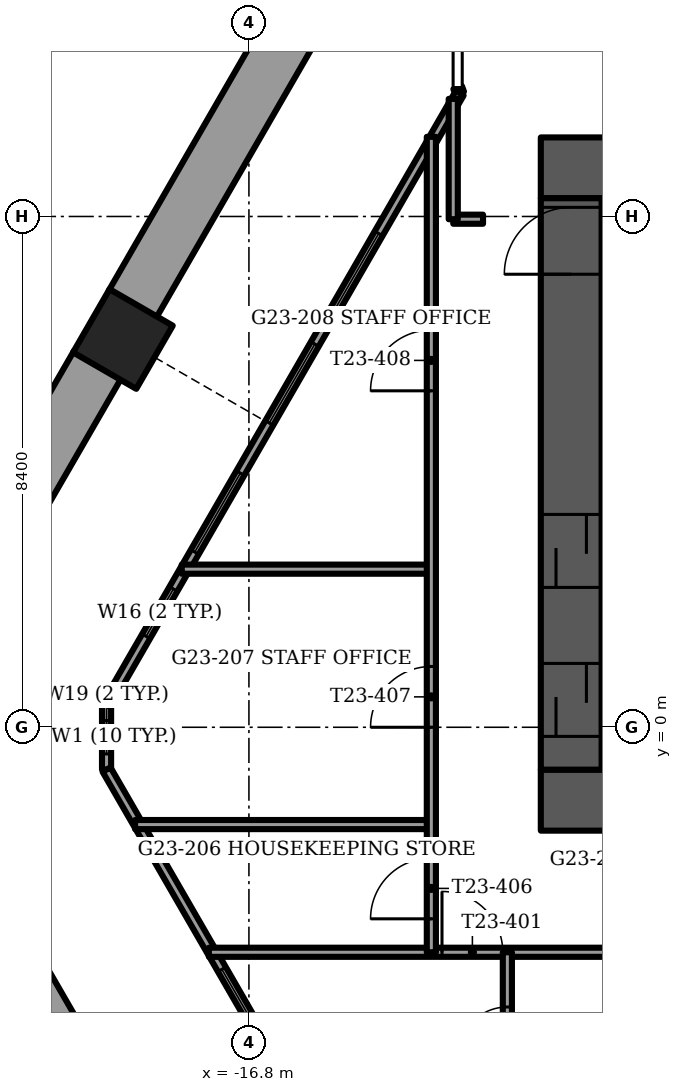
"""IFC4 building model, lengths in metres.
Left out: names, types, materials, properties, quantities, classifications, styles, units other than length and angle.
Written with IfcOpenShell. Run it as: python <this file> out.ifc"""

import sys

from ifc_helpers import new_model, si_unit, direction, frame, frame_2d, origin, origin_2d, place, context, subcontext, project, spatial, rectangle, extrude, element, fill, save


model = new_model("IFC4")
c1 = context("Model", 3, precision=1e-05, world=origin(), true_north=direction((0.0, 1.0)))
c2 = subcontext(c1, "Body", "Model", "MODEL_VIEW")
j1 = project(units=[si_unit("LENGTHUNIT", "METRE"), si_unit("PLANEANGLEUNIT", "RADIAN")], contexts=[c1])
p1 = place(None, origin())
s1 = spatial("IfcSite", under=j1, at=p1, CompositionType="ELEMENT")
p2 = place(p1, origin())
s2 = spatial("IfcBuilding", under=s1, at=p2, CompositionType="ELEMENT")
p3 = place(p2, frame((0.0, 0.0, 93.0)))
s3 = spatial("IfcBuildingStorey", under=s2, at=p3, CompositionType="ELEMENT", Elevation=93.0)
p4 = place(p3, frame((-18.872, 6.385, -1.2), z_axis=(0.0, 0.0, 1.0), x_axis=(0.5, 0.866025403784, 0.0)))
e1 = element("IfcColumn", 1, at=p4, inside=s3, PredefinedType="COLUMN", context=c2, shape_type="SweptSolid", body=[
    extrude(rectangle(XDim=1.2, YDim=1.2, at=origin_2d()), origin(), (0.0, 0.0, 1.0), 3.75),
])
p5 = place(p3, frame((-12.0, -1.2, -0.3), z_axis=(0.0, 0.0, 1.0), x_axis=(1.0, 0.0, 0.0)))
e2 = element("IfcWall", 2, at=p5, inside=s3, PredefinedType="SHEAR", context=c2, shape_type="SweptSolid", body=[
    extrude(rectangle(XDim=24.0, YDim=1.0, at=frame_2d((12.0, 0.0))), origin(), (0.0, 0.0, 1.0), 3.75),
])
p6 = place(p5, frame((11.2, 0.0, 0.0)))
e3 = element("IfcOpeningElement", 3, at=p6, cuts=e2, PredefinedType="OPENING", context=c2, shape_type="SweptSolid", body=[
    extrude(rectangle(XDim=1.6, YDim=2.1, at=frame_2d((0.8, 1.05))), frame((0.0, 0.5, 0.0), z_axis=(0.0, -1.0, 0.0), x_axis=(1.0, 0.0, 0.0)), (0.0, 0.0, 1.0), 1.0),
])
p7 = place(p3, frame((-12.0, 9.2, -0.3), z_axis=(0.0, 0.0, 1.0), x_axis=(1.0, 0.0, 0.0)))
e4 = element("IfcWall", 4, at=p7, inside=s3, PredefinedType="SHEAR", context=c2, shape_type="SweptSolid", body=[
    extrude(rectangle(XDim=24.0, YDim=1.0, at=frame_2d((12.0, 0.0))), origin(), (0.0, 0.0, 1.0), 3.75),
])
p8 = place(p7, frame((11.2, 0.0, 0.0)))
e5 = element("IfcOpeningElement", 5, at=p8, cuts=e4, PredefinedType="OPENING", context=c2, shape_type="SweptSolid", body=[
    extrude(rectangle(XDim=1.6, YDim=2.1, at=frame_2d((0.8, 1.05))), frame((0.0, 0.5, 0.0), z_axis=(0.0, -1.0, 0.0), x_axis=(1.0, 0.0, 0.0)), (0.0, 0.0, 1.0), 1.0),
])
p9 = place(p7, frame((5.25, 0.0, 0.0)))
e6 = element("IfcOpeningElement", 6, at=p9, cuts=e4, PredefinedType="OPENING", context=c2, shape_type="SweptSolid", body=[
    extrude(rectangle(XDim=1.1, YDim=2.1, at=frame_2d((0.55, 1.05))), frame((0.0, 0.5, 0.0), z_axis=(0.0, -1.0, 0.0), x_axis=(1.0, 0.0, 0.0)), (0.0, 0.0, 1.0), 1.0),
])
p10 = place(p7, frame((17.65, 0.0, 0.0)))
e7 = element("IfcOpeningElement", 7, at=p10, cuts=e4, PredefinedType="OPENING", context=c2, shape_type="SweptSolid", body=[
    extrude(rectangle(XDim=1.1, YDim=2.1, at=frame_2d((0.55, 1.05))), frame((0.0, 0.5, 0.0), z_axis=(0.0, -1.0, 0.0), x_axis=(1.0, 0.0, 0.0)), (0.0, 0.0, 1.0), 1.0),
])
p11 = place(p3, frame((-11.5, -0.7, -0.3), z_axis=(0.0, 0.0, 1.0), x_axis=(0.0, 1.0, 0.0)))
e8 = element("IfcWall", 8, at=p11, inside=s3, PredefinedType="SHEAR", context=c2, shape_type="SweptSolid", body=[
    extrude(rectangle(XDim=9.4, YDim=1.0, at=frame_2d((4.7, 0.0))), origin(), (0.0, 0.0, 1.0), 3.75),
])
p12 = place(p11, frame((8.15, 0.0, 0.0)))
e9 = element("IfcOpeningElement", 9, at=p12, cuts=e8, PredefinedType="OPENING", context=c2, shape_type="SweptSolid", body=[
    extrude(rectangle(XDim=1.1, YDim=2.1, at=frame_2d((0.55, 1.05))), frame((0.0, 0.5, 0.0), z_axis=(0.0, -1.0, 0.0), x_axis=(1.0, 0.0, 0.0)), (0.0, 0.0, 1.0), 1.0),
])
p13 = place(p11, frame((0.55, 0.0, 0.0)))
e10 = element("IfcOpeningElement", 10, at=p13, cuts=e8, PredefinedType="OPENING", context=c2, shape_type="SweptSolid", body=[
    extrude(rectangle(XDim=1.2, YDim=2.1, at=frame_2d((0.6, 1.05))), frame((0.0, 0.5, 0.0), z_axis=(0.0, -1.0, 0.0), x_axis=(1.0, 0.0, 0.0)), (0.0, 0.0, 1.0), 1.0),
])
p14 = place(p11, frame((3.0, 0.0, 0.0)))
e11 = element("IfcOpeningElement", 11, at=p14, cuts=e8, PredefinedType="OPENING", context=c2, shape_type="SweptSolid", body=[
    extrude(rectangle(XDim=1.2, YDim=2.1, at=frame_2d((0.6, 1.05))), frame((0.0, 0.5, 0.0), z_axis=(0.0, -1.0, 0.0), x_axis=(1.0, 0.0, 0.0)), (0.0, 0.0, 1.0), 1.0),
])
p15 = place(p3, frame((-15.381, 12.733, 0.0), z_axis=(0.0, 0.0, 1.0), x_axis=(-0.499999023957, -0.866025967302, 0.0)))
e12 = element("IfcWall", 12, at=p15, inside=s3, PredefinedType="PARAPET", context=c2, shape_type="SweptSolid", body=[
    extrude(rectangle(XDim=6.673, YDim=0.9, at=frame_2d((3.337, 0.0))), origin(), (0.0, 0.0, 1.0), 1.1),
])
p16 = place(p3, frame((-19.287, 5.966, 0.0), z_axis=(0.0, 0.0, 1.0), x_axis=(-0.500011789842, -0.866018596809, 0.0)))
e13 = element("IfcWall", 13, at=p16, inside=s3, PredefinedType="PARAPET", context=c2, shape_type="SweptSolid", body=[
    extrude(rectangle(XDim=6.427, YDim=0.9, at=frame_2d((3.214, 0.0))), origin(), (0.0, 0.0, 1.0), 1.1),
])
p17 = place(p3, frame((-22.501, -0.727, 0.0), z_axis=(0.0, 0.0, 1.0), x_axis=(0.500006801911, -0.866021476663, 0.0)))
e14 = element("IfcWall", 14, at=p17, inside=s3, PredefinedType="PARAPET", context=c2, shape_type="SweptSolid", body=[
    extrude(rectangle(XDim=6.144, YDim=0.9, at=frame_2d((3.072, 0.0))), origin(), (0.0, 0.0, 1.0), 1.1),
])
p18 = place(p3, frame((-13.334, 10.427, 0.0), z_axis=(0.0, 0.0, 1.0), x_axis=(-0.500002662854, -0.86602386638, 0.0)))
e15 = element("IfcWall", 15, at=p18, inside=s3, PredefinedType="SOLIDWALL", context=c2, shape_type="SweptSolid", body=[
    extrude(rectangle(XDim=11.615, YDim=0.15, at=frame_2d((5.807, 0.0))), origin(), (0.0, 0.0, 1.0), 3.45),
])
p19 = place(p18, frame((2.664, 0.0, 0.15)))
e16 = element("IfcOpeningElement", 16, at=p19, cuts=e15, PredefinedType="OPENING", context=c2, shape_type="SweptSolid", body=[
    extrude(rectangle(XDim=1.7, YDim=2.2, at=frame_2d((0.85, 1.1))), frame((0.0, 0.075, 0.0), z_axis=(0.0, -1.0, 0.0), x_axis=(1.0, 0.0, 0.0)), (0.0, 0.0, 1.0), 0.15),
])
p20 = place(p18, frame((4.764, 0.0, 0.15)))
e17 = element("IfcOpeningElement", 17, at=p20, cuts=e15, PredefinedType="OPENING", context=c2, shape_type="SweptSolid", body=[
    extrude(rectangle(XDim=1.5, YDim=2.2, at=frame_2d((0.75, 1.1))), frame((0.0, 0.075, 0.0), z_axis=(0.0, -1.0, 0.0), x_axis=(1.0, 0.0, 0.0)), (0.0, 0.0, 1.0), 0.15),
])
p21 = place(p18, frame((9.414, 0.0, 0.15)))
e18 = element("IfcOpeningElement", 18, at=p21, cuts=e15, PredefinedType="OPENING", context=c2, shape_type="SweptSolid", body=[
    extrude(rectangle(XDim=0.9, YDim=2.2, at=frame_2d((0.45, 1.1))), frame((0.0, 0.075, 0.0), z_axis=(0.0, -1.0, 0.0), x_axis=(1.0, 0.0, 0.0)), (0.0, 0.0, 1.0), 0.15),
])
p22 = place(p18, frame((7.214, 0.0, 0.15)))
e19 = element("IfcOpeningElement", 19, at=p22, cuts=e15, PredefinedType="OPENING", context=c2, shape_type="SweptSolid", body=[
    extrude(rectangle(XDim=1.5, YDim=2.2, at=frame_2d((0.75, 1.1))), frame((0.0, 0.075, 0.0), z_axis=(0.0, -1.0, 0.0), x_axis=(1.0, 0.0, 0.0)), (0.0, 0.0, 1.0), 0.15),
])
p23 = place(p3, frame((-19.141, -0.696, 0.0), z_axis=(0.0, 0.0, 1.0), x_axis=(0.500002662854, -0.86602386638, 0.0)))
e20 = element("IfcWall", 20, at=p23, inside=s3, PredefinedType="SOLIDWALL", context=c2, shape_type="SweptSolid", body=[
    extrude(rectangle(XDim=11.615, YDim=0.15, at=frame_2d((5.807, 0.0))), origin(), (0.0, 0.0, 1.0), 3.45),
])
p24 = place(p23, frame((3.792, 0.0, 0.15)))
e21 = element("IfcOpeningElement", 21, at=p24, cuts=e20, PredefinedType="OPENING", context=c2, shape_type="SweptSolid", body=[
    extrude(rectangle(XDim=1.7, YDim=2.2, at=frame_2d((0.85, 1.1))), frame((0.0, 0.075, 0.0), z_axis=(0.0, -1.0, 0.0), x_axis=(1.0, 0.0, 0.0)), (0.0, 0.0, 1.0), 0.15),
])
p25 = place(p23, frame((9.531, 0.0, 0.15)))
e22 = element("IfcOpeningElement", 22, at=p25, cuts=e20, PredefinedType="OPENING", context=c2, shape_type="SweptSolid", body=[
    extrude(rectangle(XDim=0.9, YDim=2.2, at=frame_2d((0.45, 1.1))), frame((0.0, 0.075, 0.0), z_axis=(0.0, -1.0, 0.0), x_axis=(1.0, 0.0, 0.0)), (0.0, 0.0, 1.0), 0.15),
])
p26 = place(p23, frame((7.98, 0.0, 0.0)))
e23 = element("IfcOpeningElement", 23, at=p26, cuts=e20, PredefinedType="OPENING", context=c2, shape_type="SweptSolid", body=[
    extrude(rectangle(XDim=1.5, YDim=2.4, at=frame_2d((0.75, 1.2))), frame((0.0, 0.075, 0.0), z_axis=(0.0, -1.0, 0.0), x_axis=(1.0, 0.0, 0.0)), (0.0, 0.0, 1.0), 0.15),
])
p27 = place(p3, frame((-19.141, 0.369, 0.0), z_axis=(0.0, 0.0, 1.0), x_axis=(0.0, -1.0, 0.0)))
e24 = element("IfcWall", 24, at=p27, inside=s3, PredefinedType="SOLIDWALL", context=c2, shape_type="SweptSolid", body=[
    extrude(rectangle(XDim=1.065, YDim=0.15, at=frame_2d((0.533, 0.0))), origin(), (0.0, 0.0, 1.0), 3.45),
])
p28 = place(p27, frame((0.258, 0.0, 0.15)))
e25 = element("IfcOpeningElement", 25, at=p28, cuts=e24, PredefinedType="OPENING", context=c2, shape_type="SweptSolid", body=[
    extrude(rectangle(XDim=0.55, YDim=2.2, at=frame_2d((0.275, 1.1))), frame((0.0, 0.075, 0.0), z_axis=(0.0, -1.0, 0.0), x_axis=(1.0, 0.0, 0.0)), (0.0, 0.0, 1.0), 0.15),
])
p29 = place(p3, frame((-13.334, 10.427, 0.0), z_axis=(0.0, 0.0, 1.0), x_axis=(-0.337751931921, 0.941235163221, 0.0)))
e26 = element("IfcWall", 26, at=p29, inside=s3, PredefinedType="SOLIDWALL", context=c2, shape_type="SweptSolid", body=[
    extrude(rectangle(XDim=0.098, YDim=0.15, at=frame_2d((0.049, 0.0))), origin(), (0.0, 0.0, 1.0), 3.45),
])
p30 = place(p3, frame((-17.459, -3.7, 0.0), z_axis=(0.0, 0.0, 1.0), x_axis=(1.0, 0.0, 0.0)))
e27 = element("IfcWall", 27, at=p30, inside=s3, PredefinedType="PARTITIONING", context=c2, shape_type="SweptSolid", body=[
    extrude(rectangle(XDim=8.299, YDim=0.15, at=frame_2d((4.149, 0.0))), origin(), (0.0, 0.0, 1.0), 3.45),
])
p31 = place(p30, frame((3.834, 0.0, 0.0)))
e28 = element("IfcOpeningElement", 28, at=p31, cuts=e27, PredefinedType="OPENING", context=c2, shape_type="SweptSolid", body=[
    extrude(rectangle(XDim=1.0, YDim=2.1, at=frame_2d((0.5, 1.05))), frame((0.0, 0.075, 0.0), z_axis=(0.0, -1.0, 0.0), x_axis=(1.0, 0.0, 0.0)), (0.0, 0.0, 1.0), 0.15),
])
p32 = place(p3, frame((-18.672, -1.6, 0.0), z_axis=(0.0, 0.0, 1.0), x_axis=(1.0, 0.0, 0.0)))
e29 = element("IfcWall", 29, at=p32, inside=s3, PredefinedType="PARTITIONING", context=c2, shape_type="SweptSolid", body=[
    extrude(rectangle(XDim=4.872, YDim=0.15, at=frame_2d((2.436, 0.0))), origin(), (0.0, 0.0, 1.0), 3.45),
])
p33 = place(p3, frame((-17.905, 2.6, 0.0), z_axis=(0.0, 0.0, 1.0), x_axis=(1.0, 0.0, 0.0)))
e30 = element("IfcWall", 30, at=p33, inside=s3, PredefinedType="PARTITIONING", context=c2, shape_type="SweptSolid", body=[
    extrude(rectangle(XDim=4.105, YDim=0.15, at=frame_2d((2.052, 0.0))), origin(), (0.0, 0.0, 1.0), 3.45),
])
p34 = place(p3, frame((-13.44, 8.355, 0.0), z_axis=(0.0, 0.0, 1.0), x_axis=(1.0, 0.0, 0.0)))
e31 = element("IfcWall", 31, at=p34, inside=s3, PredefinedType="PARTITIONING", context=c2, shape_type="SweptSolid", body=[
    extrude(rectangle(XDim=0.49, YDim=0.15, at=frame_2d((0.245, 0.0))), origin(), (0.0, 0.0, 1.0), 3.45),
])
p35 = place(p3, frame((-12.55, -6.3, 0.0), z_axis=(0.0, 0.0, 1.0), x_axis=(0.0, 1.0, 0.0)))
e32 = element("IfcWall", 32, at=p35, inside=s3, PredefinedType="PARTITIONING", context=c2, shape_type="SweptSolid", body=[
    extrude(rectangle(XDim=2.6, YDim=0.15, at=frame_2d((1.3, 0.0))), origin(), (0.0, 0.0, 1.0), 3.45),
])
p36 = place(p35, frame((0.9, 0.0, 0.0)))
e33 = element("IfcOpeningElement", 33, at=p36, cuts=e32, PredefinedType="OPENING", context=c2, shape_type="SweptSolid", body=[
    extrude(rectangle(XDim=0.8, YDim=2.1, at=frame_2d((0.4, 1.05))), frame((0.0, 0.075, 0.0), z_axis=(0.0, -1.0, 0.0), x_axis=(1.0, 0.0, 0.0)), (0.0, 0.0, 1.0), 0.15),
])
p37 = place(p3, frame((-13.44, 8.355, 0.0), z_axis=(0.0, 0.0, 1.0), x_axis=(0.0, 1.0, 0.0)))
e34 = element("IfcWall", 34, at=p37, inside=s3, PredefinedType="PARTITIONING", context=c2, shape_type="SweptSolid", body=[
    extrude(rectangle(XDim=1.979, YDim=0.15, at=frame_2d((0.99, 0.0))), origin(), (0.0, 0.0, 1.0), 3.45),
])
p38 = place(p3, frame((-13.8, -3.7, 0.0), z_axis=(0.0, 0.0, 1.0), x_axis=(0.0, 1.0, 0.0)))
e35 = element("IfcWall", 35, at=p38, inside=s3, PredefinedType="PARTITIONING", context=c2, shape_type="SweptSolid", body=[
    extrude(rectangle(XDim=13.41, YDim=0.15, at=frame_2d((6.705, 0.0))), origin(), (0.0, 0.0, 1.0), 3.45),
])
p39 = place(p38, frame((0.55, 0.0, 0.0)))
e36 = element("IfcOpeningElement", 36, at=p39, cuts=e35, PredefinedType="OPENING", context=c2, shape_type="SweptSolid", body=[
    extrude(rectangle(XDim=1.0, YDim=2.1, at=frame_2d((0.5, 1.05))), frame((0.0, 0.075, 0.0), z_axis=(0.0, -1.0, 0.0), x_axis=(1.0, 0.0, 0.0)), (0.0, 0.0, 1.0), 0.15),
])
p40 = place(p38, frame((3.7, 0.0, 0.0)))
e37 = element("IfcOpeningElement", 37, at=p40, cuts=e35, PredefinedType="OPENING", context=c2, shape_type="SweptSolid", body=[
    extrude(rectangle(XDim=1.0, YDim=2.1, at=frame_2d((0.5, 1.05))), frame((0.0, 0.075, 0.0), z_axis=(0.0, -1.0, 0.0), x_axis=(1.0, 0.0, 0.0)), (0.0, 0.0, 1.0), 0.15),
])
p41 = place(p38, frame((9.233, 0.0, 0.0)))
e38 = element("IfcOpeningElement", 38, at=p41, cuts=e35, PredefinedType="OPENING", context=c2, shape_type="SweptSolid", body=[
    extrude(rectangle(XDim=1.0, YDim=2.1, at=frame_2d((0.5, 1.05))), frame((0.0, 0.075, 0.0), z_axis=(0.0, -1.0, 0.0), x_axis=(1.0, 0.0, 0.0)), (0.0, 0.0, 1.0), 0.15),
])
p42 = place(p19, origin())
e39 = element("IfcWindow", 39, at=p42, inside=s3, PartitioningType="SINGLE_PANEL", PredefinedType="WINDOW", context=c2, shape_type="SweptSolid", body=[
    extrude(rectangle(XDim=1.7, YDim=2.2, at=frame_2d((0.85, 1.1))), frame((0.0, 0.03, 0.0), z_axis=(0.0, -1.0, 0.0), x_axis=(1.0, 0.0, 0.0)), (0.0, 0.0, 1.0), 0.06),
])
fill(e16, e39)
p43 = place(p20, origin())
e40 = element("IfcWindow", 40, at=p43, inside=s3, PartitioningType="SINGLE_PANEL", PredefinedType="WINDOW", context=c2, shape_type="SweptSolid", body=[
    extrude(rectangle(XDim=1.5, YDim=2.2, at=frame_2d((0.75, 1.1))), frame((0.0, 0.03, 0.0), z_axis=(0.0, -1.0, 0.0), x_axis=(1.0, 0.0, 0.0)), (0.0, 0.0, 1.0), 0.06),
])
fill(e17, e40)
p44 = place(p21, origin())
e41 = element("IfcWindow", 41, at=p44, inside=s3, PartitioningType="SINGLE_PANEL", PredefinedType="WINDOW", context=c2, shape_type="SweptSolid", body=[
    extrude(rectangle(XDim=0.9, YDim=2.2, at=frame_2d((0.45, 1.1))), frame((0.0, 0.03, 0.0), z_axis=(0.0, -1.0, 0.0), x_axis=(1.0, 0.0, 0.0)), (0.0, 0.0, 1.0), 0.06),
])
fill(e18, e41)
p45 = place(p22, origin())
e42 = element("IfcWindow", 42, at=p45, inside=s3, PartitioningType="SINGLE_PANEL", PredefinedType="WINDOW", context=c2, shape_type="SweptSolid", body=[
    extrude(rectangle(XDim=1.5, YDim=2.2, at=frame_2d((0.75, 1.1))), frame((0.0, 0.03, 0.0), z_axis=(0.0, -1.0, 0.0), x_axis=(1.0, 0.0, 0.0)), (0.0, 0.0, 1.0), 0.06),
])
fill(e19, e42)
p46 = place(p24, origin())
e43 = element("IfcWindow", 43, at=p46, inside=s3, PartitioningType="SINGLE_PANEL", PredefinedType="WINDOW", context=c2, shape_type="SweptSolid", body=[
    extrude(rectangle(XDim=1.7, YDim=2.2, at=frame_2d((0.85, 1.1))), frame((0.0, 0.03, 0.0), z_axis=(0.0, -1.0, 0.0), x_axis=(1.0, 0.0, 0.0)), (0.0, 0.0, 1.0), 0.06),
])
fill(e21, e43)
p47 = place(p28, origin())
e44 = element("IfcWindow", 44, at=p47, inside=s3, PartitioningType="SINGLE_PANEL", PredefinedType="WINDOW", context=c2, shape_type="SweptSolid", body=[
    extrude(rectangle(XDim=0.55, YDim=2.2, at=frame_2d((0.275, 1.1))), frame((0.0, 0.03, 0.0), z_axis=(0.0, -1.0, 0.0), x_axis=(1.0, 0.0, 0.0)), (0.0, 0.0, 1.0), 0.06),
])
fill(e25, e44)
p48 = place(p12, origin())
e45 = element("IfcDoor", 45, at=p48, inside=s3, OperationType="SINGLE_SWING_LEFT", PredefinedType="DOOR", context=c2, shape_type="SweptSolid", body=[
    extrude(rectangle(XDim=1.1, YDim=2.1, at=frame_2d((0.55, 1.05))), frame((0.0, 0.025, 0.0), z_axis=(0.0, -1.0, 0.0), x_axis=(1.0, 0.0, 0.0)), (0.0, 0.0, 1.0), 0.05),
])
fill(e9, e45)
p49 = place(p13, origin())
e46 = element("IfcDoor", 46, at=p49, inside=s3, OperationType="SLIDING_TO_LEFT", PredefinedType="DOOR", context=c2, shape_type="SweptSolid", body=[
    extrude(rectangle(XDim=1.2, YDim=2.1, at=frame_2d((0.6, 1.05))), frame((0.0, 0.025, 0.0), z_axis=(0.0, -1.0, 0.0), x_axis=(1.0, 0.0, 0.0)), (0.0, 0.0, 1.0), 0.05),
])
fill(e10, e46)
p50 = place(p14, origin())
e47 = element("IfcDoor", 47, at=p50, inside=s3, OperationType="SLIDING_TO_LEFT", PredefinedType="DOOR", context=c2, shape_type="SweptSolid", body=[
    extrude(rectangle(XDim=1.2, YDim=2.1, at=frame_2d((0.6, 1.05))), frame((0.0, 0.025, 0.0), z_axis=(0.0, -1.0, 0.0), x_axis=(1.0, 0.0, 0.0)), (0.0, 0.0, 1.0), 0.05),
])
fill(e11, e47)
p51 = place(p31, origin())
e48 = element("IfcDoor", 48, at=p51, inside=s3, OperationType="SINGLE_SWING_LEFT", PredefinedType="DOOR", context=c2, shape_type="SweptSolid", body=[
    extrude(rectangle(XDim=1.0, YDim=2.1, at=frame_2d((0.5, 1.05))), frame((0.0, 0.025, 0.0), z_axis=(0.0, -1.0, 0.0), x_axis=(1.0, 0.0, 0.0)), (0.0, 0.0, 1.0), 0.05),
])
fill(e28, e48)
p52 = place(p36, origin())
e49 = element("IfcDoor", 49, at=p52, inside=s3, OperationType="SINGLE_SWING_RIGHT", PredefinedType="DOOR", context=c2, shape_type="SweptSolid", body=[
    extrude(rectangle(XDim=0.8, YDim=2.1, at=frame_2d((0.4, 1.05))), frame((0.0, 0.025, 0.0), z_axis=(0.0, -1.0, 0.0), x_axis=(1.0, 0.0, 0.0)), (0.0, 0.0, 1.0), 0.05),
])
fill(e33, e49)
p53 = place(p39, origin())
e50 = element("IfcDoor", 50, at=p53, inside=s3, OperationType="SINGLE_SWING_LEFT", PredefinedType="DOOR", context=c2, shape_type="SweptSolid", body=[
    extrude(rectangle(XDim=1.0, YDim=2.1, at=frame_2d((0.5, 1.05))), frame((0.0, 0.025, 0.0), z_axis=(0.0, -1.0, 0.0), x_axis=(1.0, 0.0, 0.0)), (0.0, 0.0, 1.0), 0.05),
])
fill(e36, e50)
p54 = place(p40, origin())
e51 = element("IfcDoor", 51, at=p54, inside=s3, OperationType="SINGLE_SWING_LEFT", PredefinedType="DOOR", context=c2, shape_type="SweptSolid", body=[
    extrude(rectangle(XDim=1.0, YDim=2.1, at=frame_2d((0.5, 1.05))), frame((0.0, 0.025, 0.0), z_axis=(0.0, -1.0, 0.0), x_axis=(1.0, 0.0, 0.0)), (0.0, 0.0, 1.0), 0.05),
])
fill(e37, e51)
p55 = place(p41, origin())
e52 = element("IfcDoor", 52, at=p55, inside=s3, OperationType="SINGLE_SWING_LEFT", PredefinedType="DOOR", context=c2, shape_type="SweptSolid", body=[
    extrude(rectangle(XDim=1.0, YDim=2.1, at=frame_2d((0.5, 1.05))), frame((0.0, 0.025, 0.0), z_axis=(0.0, -1.0, 0.0), x_axis=(1.0, 0.0, 0.0)), (0.0, 0.0, 1.0), 0.05),
])
fill(e38, e52)
save(model, sys.argv[1])
